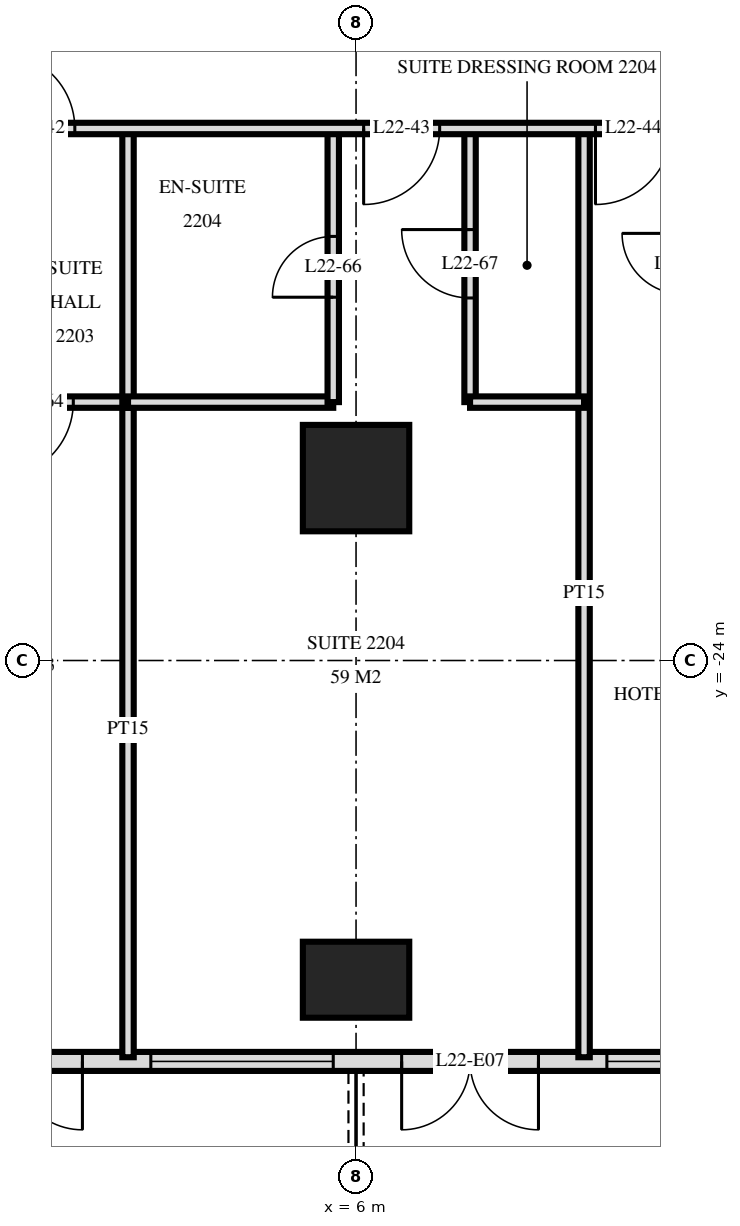
"""IFC4 building model, lengths in metres.
Left out: names, types, materials, properties, quantities, classifications, styles, units other than length and angle.
Written with IfcOpenShell. Run it as: python <this file> out.ifc"""

import sys

from ifc_helpers import new_model, si_unit, direction, frame, frame_2d, origin, origin_2d, place, context, subcontext, project, spatial, rectangle, extrude, element, fill, save


model = new_model("IFC4")
c1 = context("Model", 3, precision=1e-05, world=origin(), true_north=direction((0.0, 1.0)))
c2 = subcontext(c1, "Body", "Model", "MODEL_VIEW")
j1 = project(units=[si_unit("LENGTHUNIT", "METRE"), si_unit("PLANEANGLEUNIT", "RADIAN")], contexts=[c1])
p1 = place(None, origin())
s1 = spatial("IfcSite", under=j1, at=p1, CompositionType="ELEMENT")
p2 = place(p1, origin())
s2 = spatial("IfcBuilding", under=s1, at=p2, CompositionType="ELEMENT")
p3 = place(p2, frame((0.0, 0.0, 88.8)))
s3 = spatial("IfcBuildingStorey", under=s2, at=p3, CompositionType="ELEMENT", Elevation=88.8)
p4 = place(p3, frame((6.0, -28.2, 0.0), z_axis=(0.0, 0.0, 1.0), x_axis=(1.0, 0.0, 0.0)))
e1 = element("IfcColumn", 1, at=p4, inside=s3, PredefinedType="COLUMN", context=c2, shape_type="SweptSolid", body=[
    extrude(rectangle(XDim=1.4, YDim=1.0, at=origin_2d()), origin(), (0.0, 0.0, 1.0), 3.6),
])
p5 = place(p3, frame((6.0, -21.6, 0.0), z_axis=(0.0, 0.0, 1.0), x_axis=(1.0, 0.0, 0.0)))
e2 = element("IfcColumn", 2, at=p5, inside=s3, PredefinedType="COLUMN", context=c2, shape_type="SweptSolid", body=[
    extrude(rectangle(XDim=1.4, YDim=1.4, at=origin_2d()), origin(), (0.0, 0.0, 1.0), 3.6),
])
p6 = place(p3, frame((-28.775, -29.275, 0.0), z_axis=(0.0, 0.0, 1.0), x_axis=(1.0, 0.0, 0.0)))
e3 = element("IfcWall", 3, at=p6, inside=s3, PredefinedType="SOLIDWALL", context=c2, shape_type="SweptSolid", body=[
    extrude(rectangle(XDim=57.551, YDim=0.25, at=frame_2d((28.775, 0.0))), origin(), (0.0, 0.0, 1.0), 3.32),
])
p7 = place(p6, frame((0.575, 0.0, 0.0)))
e4 = element("IfcOpeningElement", 4, at=p7, cuts=e3, PredefinedType="OPENING", context=c2, shape_type="SweptSolid", body=[
    extrude(rectangle(XDim=1.8, YDim=2.4, at=frame_2d((0.9, 1.2))), frame((0.0, 0.135, 0.0), z_axis=(0.0, -1.0, 0.0), x_axis=(1.0, 0.0, 0.0)), (0.0, 0.0, 1.0), 0.27),
])
p8 = place(p6, frame((5.075, 0.0, 0.3)))
e5 = element("IfcOpeningElement", 5, at=p8, cuts=e3, PredefinedType="OPENING", context=c2, shape_type="SweptSolid", body=[
    extrude(rectangle(XDim=2.4, YDim=2.1, at=frame_2d((1.2, 1.05))), frame((0.0, 0.135, 0.0), z_axis=(0.0, -1.0, 0.0), x_axis=(1.0, 0.0, 0.0)), (0.0, 0.0, 1.0), 0.27),
])
p9 = place(p6, frame((8.375, 0.0, 0.0)))
e6 = element("IfcOpeningElement", 6, at=p9, cuts=e3, PredefinedType="OPENING", context=c2, shape_type="SweptSolid", body=[
    extrude(rectangle(XDim=1.8, YDim=2.4, at=frame_2d((0.9, 1.2))), frame((0.0, 0.135, 0.0), z_axis=(0.0, -1.0, 0.0), x_axis=(1.0, 0.0, 0.0)), (0.0, 0.0, 1.0), 0.27),
])
p10 = place(p6, frame((11.375, 0.0, 0.0)))
e7 = element("IfcOpeningElement", 7, at=p10, cuts=e3, PredefinedType="OPENING", context=c2, shape_type="SweptSolid", body=[
    extrude(rectangle(XDim=1.8, YDim=2.4, at=frame_2d((0.9, 1.2))), frame((0.0, 0.135, 0.0), z_axis=(0.0, -1.0, 0.0), x_axis=(1.0, 0.0, 0.0)), (0.0, 0.0, 1.0), 0.27),
])
p11 = place(p6, frame((14.075, 0.0, 0.3)))
e8 = element("IfcOpeningElement", 8, at=p11, cuts=e3, PredefinedType="OPENING", context=c2, shape_type="SweptSolid", body=[
    extrude(rectangle(XDim=2.4, YDim=2.1, at=frame_2d((1.2, 1.05))), frame((0.0, 0.135, 0.0), z_axis=(0.0, -1.0, 0.0), x_axis=(1.0, 0.0, 0.0)), (0.0, 0.0, 1.0), 0.27),
])
p12 = place(p6, frame((17.375, 0.0, 0.0)))
e9 = element("IfcOpeningElement", 9, at=p12, cuts=e3, PredefinedType="OPENING", context=c2, shape_type="SweptSolid", body=[
    extrude(rectangle(XDim=1.8, YDim=2.4, at=frame_2d((0.9, 1.2))), frame((0.0, 0.135, 0.0), z_axis=(0.0, -1.0, 0.0), x_axis=(1.0, 0.0, 0.0)), (0.0, 0.0, 1.0), 0.27),
])
p13 = place(p6, frame((20.075, 0.0, 0.3)))
e10 = element("IfcOpeningElement", 10, at=p13, cuts=e3, PredefinedType="OPENING", context=c2, shape_type="SweptSolid", body=[
    extrude(rectangle(XDim=2.4, YDim=2.1, at=frame_2d((1.2, 1.05))), frame((0.0, 0.135, 0.0), z_axis=(0.0, -1.0, 0.0), x_axis=(1.0, 0.0, 0.0)), (0.0, 0.0, 1.0), 0.27),
])
p14 = place(p6, frame((23.075, 0.0, 0.3)))
e11 = element("IfcOpeningElement", 11, at=p14, cuts=e3, PredefinedType="OPENING", context=c2, shape_type="SweptSolid", body=[
    extrude(rectangle(XDim=2.4, YDim=2.1, at=frame_2d((1.2, 1.05))), frame((0.0, 0.135, 0.0), z_axis=(0.0, -1.0, 0.0), x_axis=(1.0, 0.0, 0.0)), (0.0, 0.0, 1.0), 0.27),
])
p15 = place(p6, frame((26.375, 0.0, 0.0)))
e12 = element("IfcOpeningElement", 12, at=p15, cuts=e3, PredefinedType="OPENING", context=c2, shape_type="SweptSolid", body=[
    extrude(rectangle(XDim=1.8, YDim=2.4, at=frame_2d((0.9, 1.2))), frame((0.0, 0.135, 0.0), z_axis=(0.0, -1.0, 0.0), x_axis=(1.0, 0.0, 0.0)), (0.0, 0.0, 1.0), 0.27),
])
p16 = place(p6, frame((29.375, 0.0, 0.0)))
e13 = element("IfcOpeningElement", 13, at=p16, cuts=e3, PredefinedType="OPENING", context=c2, shape_type="SweptSolid", body=[
    extrude(rectangle(XDim=1.8, YDim=2.4, at=frame_2d((0.9, 1.2))), frame((0.0, 0.135, 0.0), z_axis=(0.0, -1.0, 0.0), x_axis=(1.0, 0.0, 0.0)), (0.0, 0.0, 1.0), 0.27),
])
p17 = place(p6, frame((32.075, 0.0, 0.3)))
e14 = element("IfcOpeningElement", 14, at=p17, cuts=e3, PredefinedType="OPENING", context=c2, shape_type="SweptSolid", body=[
    extrude(rectangle(XDim=2.4, YDim=2.1, at=frame_2d((1.2, 1.05))), frame((0.0, 0.135, 0.0), z_axis=(0.0, -1.0, 0.0), x_axis=(1.0, 0.0, 0.0)), (0.0, 0.0, 1.0), 0.27),
])
p18 = place(p6, frame((35.375, 0.0, 0.0)))
e15 = element("IfcOpeningElement", 15, at=p18, cuts=e3, PredefinedType="OPENING", context=c2, shape_type="SweptSolid", body=[
    extrude(rectangle(XDim=1.8, YDim=2.4, at=frame_2d((0.9, 1.2))), frame((0.0, 0.135, 0.0), z_axis=(0.0, -1.0, 0.0), x_axis=(1.0, 0.0, 0.0)), (0.0, 0.0, 1.0), 0.27),
])
p19 = place(p6, frame((38.075, 0.0, 0.3)))
e16 = element("IfcOpeningElement", 16, at=p19, cuts=e3, PredefinedType="OPENING", context=c2, shape_type="SweptSolid", body=[
    extrude(rectangle(XDim=2.4, YDim=2.1, at=frame_2d((1.2, 1.05))), frame((0.0, 0.135, 0.0), z_axis=(0.0, -1.0, 0.0), x_axis=(1.0, 0.0, 0.0)), (0.0, 0.0, 1.0), 0.27),
])
p20 = place(p6, frame((41.075, 0.0, 0.3)))
e17 = element("IfcOpeningElement", 17, at=p20, cuts=e3, PredefinedType="OPENING", context=c2, shape_type="SweptSolid", body=[
    extrude(rectangle(XDim=2.4, YDim=2.1, at=frame_2d((1.2, 1.05))), frame((0.0, 0.135, 0.0), z_axis=(0.0, -1.0, 0.0), x_axis=(1.0, 0.0, 0.0)), (0.0, 0.0, 1.0), 0.27),
])
p21 = place(p6, frame((44.375, 0.0, 0.0)))
e18 = element("IfcOpeningElement", 18, at=p21, cuts=e3, PredefinedType="OPENING", context=c2, shape_type="SweptSolid", body=[
    extrude(rectangle(XDim=1.8, YDim=2.4, at=frame_2d((0.9, 1.2))), frame((0.0, 0.135, 0.0), z_axis=(0.0, -1.0, 0.0), x_axis=(1.0, 0.0, 0.0)), (0.0, 0.0, 1.0), 0.27),
])
p22 = place(p6, frame((47.075, 0.0, 0.3)))
e19 = element("IfcOpeningElement", 19, at=p22, cuts=e3, PredefinedType="OPENING", context=c2, shape_type="SweptSolid", body=[
    extrude(rectangle(XDim=2.4, YDim=2.1, at=frame_2d((1.2, 1.05))), frame((0.0, 0.135, 0.0), z_axis=(0.0, -1.0, 0.0), x_axis=(1.0, 0.0, 0.0)), (0.0, 0.0, 1.0), 0.27),
])
p23 = place(p6, frame((50.375, 0.0, 0.0)))
e20 = element("IfcOpeningElement", 20, at=p23, cuts=e3, PredefinedType="OPENING", context=c2, shape_type="SweptSolid", body=[
    extrude(rectangle(XDim=1.8, YDim=2.4, at=frame_2d((0.9, 1.2))), frame((0.0, 0.135, 0.0), z_axis=(0.0, -1.0, 0.0), x_axis=(1.0, 0.0, 0.0)), (0.0, 0.0, 1.0), 0.27),
])
p24 = place(p6, frame((53.375, 0.0, 0.0)))
e21 = element("IfcOpeningElement", 21, at=p24, cuts=e3, PredefinedType="OPENING", context=c2, shape_type="SweptSolid", body=[
    extrude(rectangle(XDim=1.8, YDim=2.4, at=frame_2d((0.9, 1.2))), frame((0.0, 0.135, 0.0), z_axis=(0.0, -1.0, 0.0), x_axis=(1.0, 0.0, 0.0)), (0.0, 0.0, 1.0), 0.27),
])
p25 = place(p3, frame((9.0, -29.22, 0.0), z_axis=(0.0, 0.0, 1.0), x_axis=(0.0, 1.0, 0.0)))
e22 = element("IfcWall", 22, at=p25, inside=s3, PredefinedType="PARTITIONING", context=c2, shape_type="SweptSolid", body=[
    extrude(rectangle(XDim=12.22, YDim=0.15, at=frame_2d((6.11, 0.0))), origin(), (0.0, 0.0, 1.0), 3.32),
])
p26 = place(p3, frame((7.5, -20.6, 0.0), z_axis=(0.0, 0.0, 1.0), x_axis=(0.0, 1.0, 0.0)))
e23 = element("IfcWall", 23, at=p26, inside=s3, PredefinedType="PARTITIONING", context=c2, shape_type="SweptSolid", body=[
    extrude(rectangle(XDim=3.6, YDim=0.15, at=frame_2d((1.8, 0.0))), origin(), (0.0, 0.0, 1.0), 3.32),
])
p27 = place(p26, frame((1.37, 0.0, 0.0)))
e24 = element("IfcOpeningElement", 24, at=p27, cuts=e23, PredefinedType="OPENING", context=c2, shape_type="SweptSolid", body=[
    extrude(rectangle(XDim=0.9, YDim=2.1, at=frame_2d((0.45, 1.05))), frame((0.0, 0.085, 0.0), z_axis=(0.0, -1.0, 0.0), x_axis=(1.0, 0.0, 0.0)), (0.0, 0.0, 1.0), 0.17),
])
p28 = place(p3, frame((5.7, -20.6, 0.0), z_axis=(0.0, 0.0, 1.0), x_axis=(0.0, 1.0, 0.0)))
e25 = element("IfcWall", 25, at=p28, inside=s3, PredefinedType="PARTITIONING", context=c2, shape_type="SweptSolid", body=[
    extrude(rectangle(XDim=3.6, YDim=0.15, at=frame_2d((1.8, 0.0))), origin(), (0.0, 0.0, 1.0), 3.32),
])
p29 = place(p28, frame((1.38, 0.0, 0.0)))
e26 = element("IfcOpeningElement", 26, at=p29, cuts=e25, PredefinedType="OPENING", context=c2, shape_type="SweptSolid", body=[
    extrude(rectangle(XDim=0.8, YDim=2.1, at=frame_2d((0.4, 1.05))), frame((0.0, 0.085, 0.0), z_axis=(0.0, -1.0, 0.0), x_axis=(1.0, 0.0, 0.0)), (0.0, 0.0, 1.0), 0.17),
])
p30 = place(p3, frame((3.0, -20.6, 0.0), z_axis=(0.0, 0.0, 1.0), x_axis=(0.0, 1.0, 0.0)))
e27 = element("IfcWall", 27, at=p30, inside=s3, PredefinedType="PARTITIONING", context=c2, shape_type="SweptSolid", body=[
    extrude(rectangle(XDim=3.6, YDim=0.15, at=frame_2d((1.8, 0.0))), origin(), (0.0, 0.0, 1.0), 3.32),
])
p31 = place(p3, frame((3.0, -29.22, 0.0), z_axis=(0.0, 0.0, 1.0), x_axis=(0.0, 1.0, 0.0)))
e28 = element("IfcWall", 28, at=p31, inside=s3, PredefinedType="PARTITIONING", context=c2, shape_type="SweptSolid", body=[
    extrude(rectangle(XDim=8.62, YDim=0.15, at=frame_2d((4.31, 0.0))), origin(), (0.0, 0.0, 1.0), 3.32),
])
p32 = place(p3, frame((0.6, -20.6, 0.0), z_axis=(0.0, 0.0, 1.0), x_axis=(1.0, 0.0, 0.0)))
e29 = element("IfcWall", 29, at=p32, inside=s3, PredefinedType="PARTITIONING", context=c2, shape_type="SweptSolid", body=[
    extrude(rectangle(XDim=2.4, YDim=0.15, at=frame_2d((1.2, 0.0))), origin(), (0.0, 0.0, 1.0), 3.32),
])
p33 = place(p32, frame((0.68, 0.0, 0.0)))
e30 = element("IfcOpeningElement", 30, at=p33, cuts=e29, PredefinedType="OPENING", context=c2, shape_type="SweptSolid", body=[
    extrude(rectangle(XDim=1.0, YDim=2.1, at=frame_2d((0.5, 1.05))), frame((0.0, 0.085, 0.0), z_axis=(0.0, -1.0, 0.0), x_axis=(1.0, 0.0, 0.0)), (0.0, 0.0, 1.0), 0.17),
])
p34 = place(p3, frame((3.0, -20.6, 0.0), z_axis=(0.0, 0.0, 1.0), x_axis=(1.0, 0.0, 0.0)))
e31 = element("IfcWall", 31, at=p34, inside=s3, PredefinedType="PARTITIONING", context=c2, shape_type="SweptSolid", body=[
    extrude(rectangle(XDim=2.7, YDim=0.15, at=frame_2d((1.35, 0.0))), origin(), (0.0, 0.0, 1.0), 3.32),
])
p35 = place(p3, frame((7.5, -20.6, 0.0), z_axis=(0.0, 0.0, 1.0), x_axis=(1.0, 0.0, 0.0)))
e32 = element("IfcWall", 32, at=p35, inside=s3, PredefinedType="PARTITIONING", context=c2, shape_type="SweptSolid", body=[
    extrude(rectangle(XDim=1.5, YDim=0.15, at=frame_2d((0.75, 0.0))), origin(), (0.0, 0.0, 1.0), 3.32),
])
p36 = place(p3, frame((-33.12, -17.0, 0.0), z_axis=(0.0, 0.0, 1.0), x_axis=(1.0, 0.0, 0.0)))
e33 = element("IfcWall", 33, at=p36, inside=s3, PredefinedType="PARTITIONING", context=c2, shape_type="SweptSolid", body=[
    extrude(rectangle(XDim=66.24, YDim=0.15, at=frame_2d((33.12, 0.0))), origin(), (0.0, 0.0, 1.0), 3.32),
])
p37 = place(p36, frame((16.27, 0.0, 0.0)))
e34 = element("IfcOpeningElement", 34, at=p37, cuts=e33, PredefinedType="OPENING", context=c2, shape_type="SweptSolid", body=[
    extrude(rectangle(XDim=1.0, YDim=2.1, at=frame_2d((0.5, 1.05))), frame((0.0, 0.085, 0.0), z_axis=(0.0, -1.0, 0.0), x_axis=(1.0, 0.0, 0.0)), (0.0, 0.0, 1.0), 0.17),
])
p38 = place(p36, frame((22.97, 0.0, 0.0)))
e35 = element("IfcOpeningElement", 35, at=p38, cuts=e33, PredefinedType="OPENING", context=c2, shape_type="SweptSolid", body=[
    extrude(rectangle(XDim=1.0, YDim=2.1, at=frame_2d((0.5, 1.05))), frame((0.0, 0.085, 0.0), z_axis=(0.0, -1.0, 0.0), x_axis=(1.0, 0.0, 0.0)), (0.0, 0.0, 1.0), 0.17),
])
p39 = place(p36, frame((34.42, 0.0, 0.0)))
e36 = element("IfcOpeningElement", 36, at=p39, cuts=e33, PredefinedType="OPENING", context=c2, shape_type="SweptSolid", body=[
    extrude(rectangle(XDim=1.0, YDim=2.1, at=frame_2d((0.5, 1.05))), frame((0.0, 0.085, 0.0), z_axis=(0.0, -1.0, 0.0), x_axis=(1.0, 0.0, 0.0)), (0.0, 0.0, 1.0), 0.17),
])
p40 = place(p36, frame((39.22, 0.0, 0.0)))
e37 = element("IfcOpeningElement", 37, at=p40, cuts=e33, PredefinedType="OPENING", context=c2, shape_type="SweptSolid", body=[
    extrude(rectangle(XDim=1.0, YDim=2.1, at=frame_2d((0.5, 1.05))), frame((0.0, 0.085, 0.0), z_axis=(0.0, -1.0, 0.0), x_axis=(1.0, 0.0, 0.0)), (0.0, 0.0, 1.0), 0.17),
])
p41 = place(p36, frame((42.27, 0.0, 0.0)))
e38 = element("IfcOpeningElement", 38, at=p41, cuts=e33, PredefinedType="OPENING", context=c2, shape_type="SweptSolid", body=[
    extrude(rectangle(XDim=1.0, YDim=2.1, at=frame_2d((0.5, 1.05))), frame((0.0, 0.085, 0.0), z_axis=(0.0, -1.0, 0.0), x_axis=(1.0, 0.0, 0.0)), (0.0, 0.0, 1.0), 0.17),
])
p42 = place(p36, frame((45.82, 0.0, 0.0)))
e39 = element("IfcOpeningElement", 39, at=p42, cuts=e33, PredefinedType="OPENING", context=c2, shape_type="SweptSolid", body=[
    extrude(rectangle(XDim=1.0, YDim=2.1, at=frame_2d((0.5, 1.05))), frame((0.0, 0.085, 0.0), z_axis=(0.0, -1.0, 0.0), x_axis=(1.0, 0.0, 0.0)), (0.0, 0.0, 1.0), 0.17),
])
p43 = place(p36, frame((13.42, 0.0, 0.0)))
e40 = element("IfcOpeningElement", 40, at=p43, cuts=e33, PredefinedType="OPENING", context=c2, shape_type="SweptSolid", body=[
    extrude(rectangle(XDim=1.0, YDim=2.1, at=frame_2d((0.5, 1.05))), frame((0.0, 0.085, 0.0), z_axis=(0.0, -1.0, 0.0), x_axis=(1.0, 0.0, 0.0)), (0.0, 0.0, 1.0), 0.17),
])
p44 = place(p36, frame((54.82, 0.0, 0.0)))
e41 = element("IfcOpeningElement", 41, at=p44, cuts=e33, PredefinedType="OPENING", context=c2, shape_type="SweptSolid", body=[
    extrude(rectangle(XDim=1.0, YDim=2.1, at=frame_2d((0.5, 1.05))), frame((0.0, 0.085, 0.0), z_axis=(0.0, -1.0, 0.0), x_axis=(1.0, 0.0, 0.0)), (0.0, 0.0, 1.0), 0.17),
])
p45 = place(p16, frame((0.9, 0.0, 0.0), z_axis=(0.0, 0.0, 1.0), x_axis=(-1.0, 0.0, 0.0)))
e42 = element("IfcDoor", 42, at=p45, inside=s3, OperationType="DOUBLE_DOOR_SINGLE_SWING", PredefinedType="DOOR", context=c2, shape_type="SweptSolid", body=[
    extrude(rectangle(XDim=1.8, YDim=2.4, at=frame_2d((0.0, 1.2))), frame((0.0, -0.025, 0.0), z_axis=(0.0, 1.0, 0.0), x_axis=(-1.0, 0.0, 0.0)), (0.0, 0.0, 1.0), 0.05),
])
fill(e13, e42)
p46 = place(p17, origin())
e43 = element("IfcWindow", 43, at=p46, inside=s3, PartitioningType="SINGLE_PANEL", PredefinedType="WINDOW", context=c2, shape_type="SweptSolid", body=[
    extrude(rectangle(XDim=2.4, YDim=2.1, at=frame_2d((1.2, 1.05))), frame((0.0, 0.03, 0.0), z_axis=(0.0, -1.0, 0.0), x_axis=(1.0, 0.0, 0.0)), (0.0, 0.0, 1.0), 0.06),
])
fill(e14, e43)
p47 = place(p18, frame((0.9, 0.0, 0.0), z_axis=(0.0, 0.0, 1.0), x_axis=(-1.0, 0.0, 0.0)))
e44 = element("IfcDoor", 44, at=p47, inside=s3, OperationType="DOUBLE_DOOR_SINGLE_SWING", PredefinedType="DOOR", context=c2, shape_type="SweptSolid", body=[
    extrude(rectangle(XDim=1.8, YDim=2.4, at=frame_2d((0.0, 1.2))), frame((0.0, -0.025, 0.0), z_axis=(0.0, 1.0, 0.0), x_axis=(-1.0, 0.0, 0.0)), (0.0, 0.0, 1.0), 0.05),
])
fill(e15, e44)
p48 = place(p19, origin())
e45 = element("IfcWindow", 45, at=p48, inside=s3, PartitioningType="SINGLE_PANEL", PredefinedType="WINDOW", context=c2, shape_type="SweptSolid", body=[
    extrude(rectangle(XDim=2.4, YDim=2.1, at=frame_2d((1.2, 1.05))), frame((0.0, 0.03, 0.0), z_axis=(0.0, -1.0, 0.0), x_axis=(1.0, 0.0, 0.0)), (0.0, 0.0, 1.0), 0.06),
])
fill(e16, e45)
p49 = place(p39, origin())
e46 = element("IfcDoor", 46, at=p49, inside=s3, OperationType="SINGLE_SWING_RIGHT", PredefinedType="DOOR", context=c2, shape_type="SweptSolid", body=[
    extrude(rectangle(XDim=1.0, YDim=2.1, at=frame_2d((0.5, 1.05))), frame((0.0, 0.025, 0.0), z_axis=(0.0, -1.0, 0.0), x_axis=(1.0, 0.0, 0.0)), (0.0, 0.0, 1.0), 0.05),
])
fill(e36, e46)
p50 = place(p40, frame((0.5, 0.0, 0.0), z_axis=(0.0, 0.0, 1.0), x_axis=(-1.0, 0.0, 0.0)))
e47 = element("IfcDoor", 47, at=p50, inside=s3, OperationType="SINGLE_SWING_LEFT", PredefinedType="DOOR", context=c2, shape_type="SweptSolid", body=[
    extrude(rectangle(XDim=1.0, YDim=2.1, at=frame_2d((0.0, 1.05))), frame((0.0, -0.025, 0.0), z_axis=(0.0, 1.0, 0.0), x_axis=(-1.0, 0.0, 0.0)), (0.0, 0.0, 1.0), 0.05),
])
fill(e37, e47)
p51 = place(p41, frame((0.5, 0.0, 0.0), z_axis=(0.0, 0.0, 1.0), x_axis=(-1.0, 0.0, 0.0)))
e48 = element("IfcDoor", 48, at=p51, inside=s3, OperationType="SINGLE_SWING_LEFT", PredefinedType="DOOR", context=c2, shape_type="SweptSolid", body=[
    extrude(rectangle(XDim=1.0, YDim=2.1, at=frame_2d((0.0, 1.05))), frame((0.0, -0.025, 0.0), z_axis=(0.0, 1.0, 0.0), x_axis=(-1.0, 0.0, 0.0)), (0.0, 0.0, 1.0), 0.05),
])
fill(e38, e48)
p52 = place(p33, frame((0.5, 0.0, 0.0), z_axis=(0.0, 0.0, 1.0), x_axis=(-1.0, 0.0, 0.0)))
e49 = element("IfcDoor", 49, at=p52, inside=s3, OperationType="SINGLE_SWING_LEFT", PredefinedType="DOOR", context=c2, shape_type="SweptSolid", body=[
    extrude(rectangle(XDim=1.0, YDim=2.1, at=frame_2d((0.0, 1.05))), frame((0.0, -0.025, 0.0), z_axis=(0.0, 1.0, 0.0), x_axis=(-1.0, 0.0, 0.0)), (0.0, 0.0, 1.0), 0.05),
])
fill(e30, e49)
p53 = place(p29, origin())
e50 = element("IfcDoor", 50, at=p53, inside=s3, OperationType="SINGLE_SWING_RIGHT", PredefinedType="DOOR", context=c2, shape_type="SweptSolid", body=[
    extrude(rectangle(XDim=0.8, YDim=2.1, at=frame_2d((0.4, 1.05))), frame((0.0, 0.025, 0.0), z_axis=(0.0, -1.0, 0.0), x_axis=(1.0, 0.0, 0.0)), (0.0, 0.0, 1.0), 0.05),
])
fill(e26, e50)
p54 = place(p27, origin())
e51 = element("IfcDoor", 51, at=p54, inside=s3, OperationType="SINGLE_SWING_LEFT", PredefinedType="DOOR", context=c2, shape_type="SweptSolid", body=[
    extrude(rectangle(XDim=0.9, YDim=2.1, at=frame_2d((0.45, 1.05))), frame((0.0, 0.025, 0.0), z_axis=(0.0, -1.0, 0.0), x_axis=(1.0, 0.0, 0.0)), (0.0, 0.0, 1.0), 0.05),
])
fill(e24, e51)
save(model, sys.argv[1])
